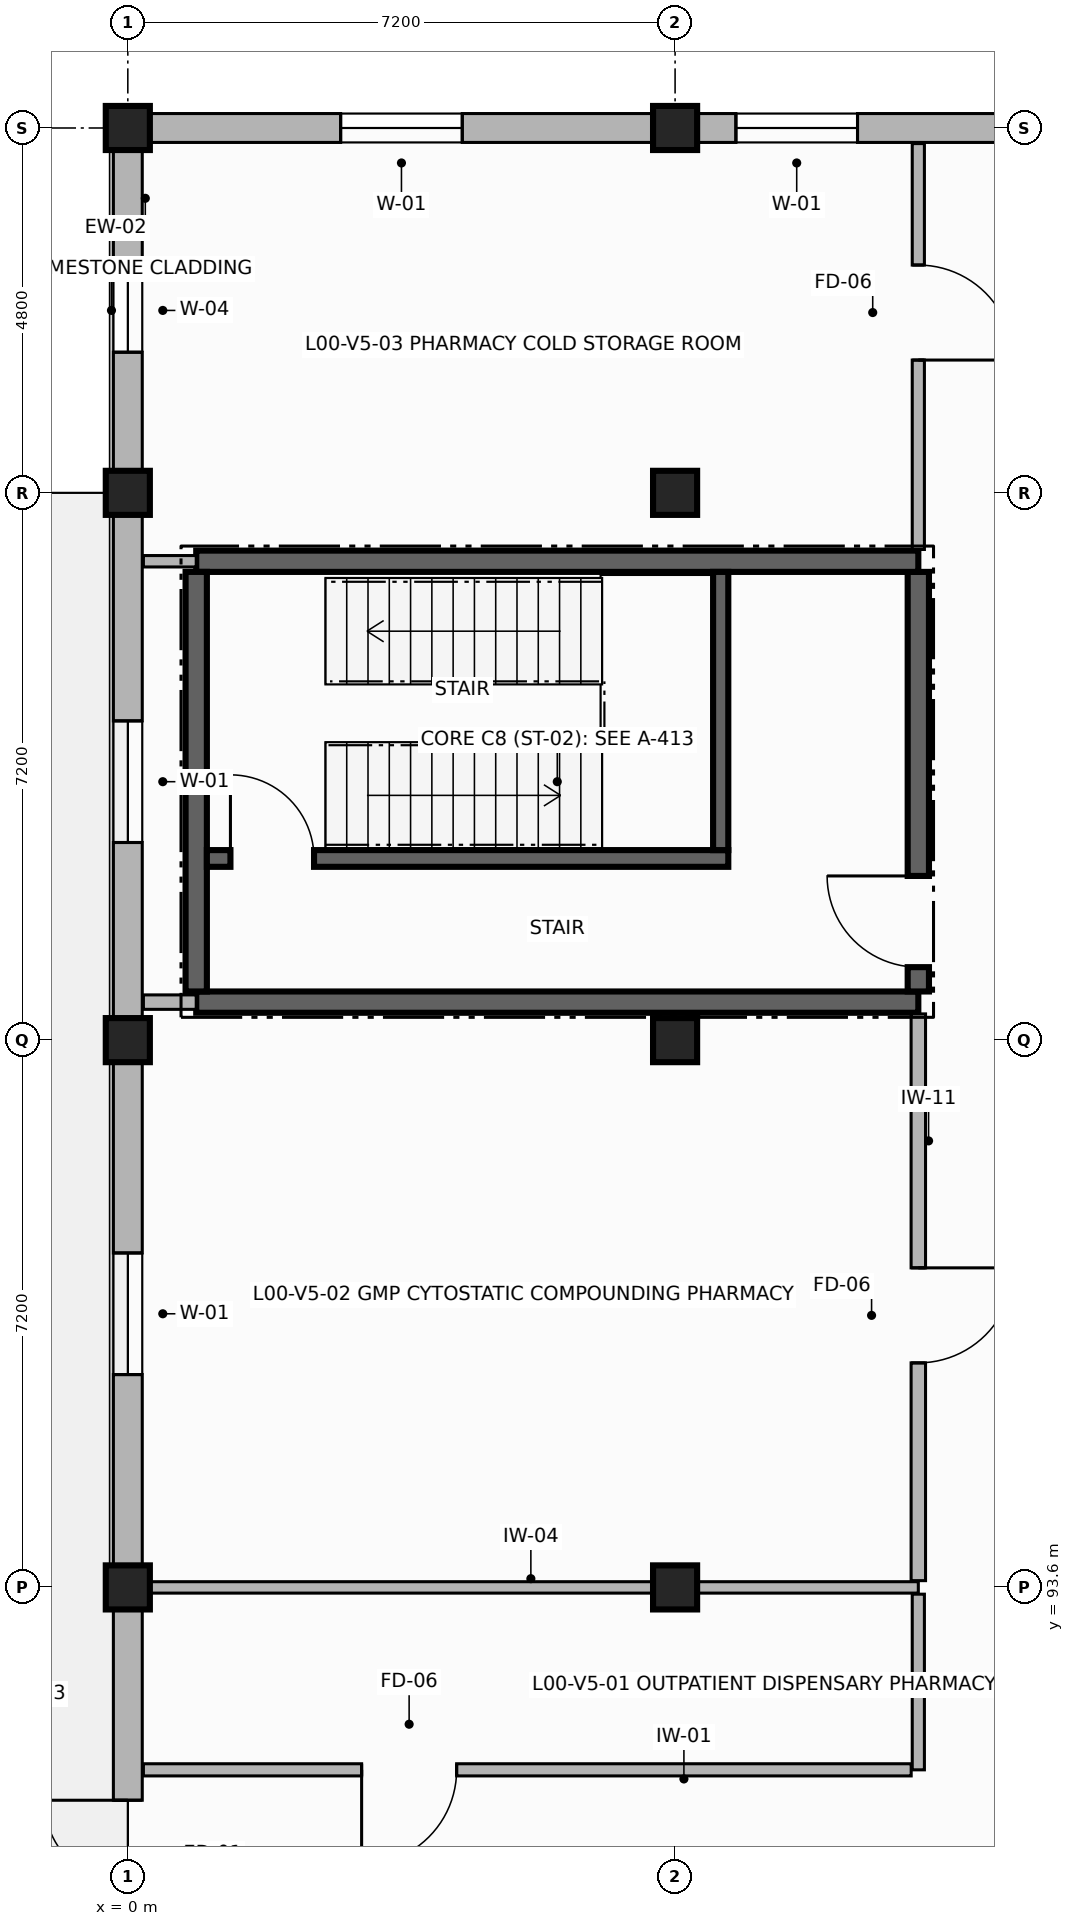
"""IFC4 building model, lengths in metres.
Left out: names, types, materials, properties, quantities, classifications, styles, units other than length and angle.
Written with IfcOpenShell. Run it as: python <this file> out.ifc"""

import sys

from ifc_helpers import new_model, si_unit, direction, frame, frame_2d, origin, origin_2d, place, context, subcontext, project, spatial, rectangle, extrude, element, fill, save


model = new_model("IFC4")
c1 = context("Model", 3, precision=1e-05, world=origin(), true_north=direction((0.0, 1.0)))
c2 = subcontext(c1, "Body", "Model", "MODEL_VIEW")
j1 = project(units=[si_unit("LENGTHUNIT", "METRE"), si_unit("PLANEANGLEUNIT", "RADIAN")], contexts=[c1])
p1 = place(None, origin())
s1 = spatial("IfcSite", under=j1, at=p1, CompositionType="ELEMENT")
p2 = place(p1, origin())
s2 = spatial("IfcBuilding", under=s1, at=p2, CompositionType="ELEMENT")
p3 = place(p2, origin())
s3 = spatial("IfcBuildingStorey", under=s2, at=p3, CompositionType="ELEMENT", Elevation=0.0)
for number, where, z_axis, x_axis in (
    (1, (0.0, 93.6, -0.38), (0.0, 0.0, 1.0), (1.0, 0.0, 0.0)),
    (2, (0.0, 100.8, -0.38), (0.0, 0.0, 1.0), (1.0, 0.0, 0.0)),
    (3, (0.0, 108.0, -0.38), (0.0, 0.0, 1.0), (1.0, 0.0, 0.0)),
    (4, (0.0, 112.8, -0.38), (0.0, 0.0, 1.0), (1.0, 0.0, 0.0)),
    (5, (7.2, 93.6, -0.38), (0.0, 0.0, 1.0), (1.0, 0.0, 0.0)),
    (6, (7.2, 100.8, -0.38), (0.0, 0.0, 1.0), (1.0, 0.0, 0.0)),
    (7, (7.2, 108.0, -0.38), (0.0, 0.0, 1.0), (1.0, 0.0, 0.0)),
    (8, (7.2, 112.8, -0.38), (0.0, 0.0, 1.0), (1.0, 0.0, 0.0)),
):
    element("IfcColumn", number, at=place(p3, frame(where, z_axis=z_axis, x_axis=x_axis)), inside=s3, PredefinedType="COLUMN", context=c2, shape_type="SweptSolid", body=[
        extrude(rectangle(XDim=0.58, YDim=0.58, at=origin_2d()), origin(), (0.0, 0.0, 1.0), 4.57),
    ])
p4 = place(p3, frame((14.4, 112.8, 0.0), z_axis=(0.0, 0.0, 1.0), x_axis=(-1.0, 0.0, 0.0)))
e9 = element("IfcWall", 9, at=p4, inside=s3, PredefinedType="SOLIDWALL", context=c2, shape_type="SweptSolid", body=[
    extrude(rectangle(XDim=7.2, YDim=0.38, at=frame_2d((3.6, 0.0))), origin(), (0.0, 0.0, 1.0), 3.52),
])
p5 = place(p4, frame((4.8, 0.0, 0.85)))
e10 = element("IfcOpeningElement", 10, at=p5, cuts=e9, PredefinedType="OPENING", context=c2, shape_type="SweptSolid", body=[
    extrude(rectangle(XDim=1.6, YDim=2.45, at=frame_2d((0.8, 1.225))), frame((0.0, 0.2, 0.0), z_axis=(0.0, -1.0, 0.0), x_axis=(1.0, 0.0, 0.0)), (0.0, 0.0, 1.0), 0.4),
])
p6 = place(p3, frame((7.2, 112.8, 0.0), z_axis=(0.0, 0.0, 1.0), x_axis=(-1.0, 0.0, 0.0)))
e11 = element("IfcWall", 11, at=p6, inside=s3, PredefinedType="SOLIDWALL", context=c2, shape_type="SweptSolid", body=[
    extrude(rectangle(XDim=7.2, YDim=0.38, at=frame_2d((3.6, 0.0))), origin(), (0.0, 0.0, 1.0), 3.52),
])
p7 = place(p6, frame((2.8, 0.0, 0.85)))
e12 = element("IfcOpeningElement", 12, at=p7, cuts=e11, PredefinedType="OPENING", context=c2, shape_type="SweptSolid", body=[
    extrude(rectangle(XDim=1.6, YDim=2.45, at=frame_2d((0.8, 1.225))), frame((0.0, 0.2, 0.0), z_axis=(0.0, -1.0, 0.0), x_axis=(1.0, 0.0, 0.0)), (0.0, 0.0, 1.0), 0.4),
])
p8 = place(p3, frame((0.0, 112.8, 0.0), z_axis=(0.0, 0.0, 1.0), x_axis=(0.0, -1.0, 0.0)))
e13 = element("IfcWall", 13, at=p8, inside=s3, PredefinedType="SOLIDWALL", context=c2, shape_type="SweptSolid", body=[
    extrude(rectangle(XDim=4.8, YDim=0.38, at=frame_2d((2.4, 0.0))), origin(), (0.0, 0.0, 1.0), 3.52),
])
p9 = place(p8, frame((1.85, 0.0, 0.85)))
e14 = element("IfcOpeningElement", 14, at=p9, cuts=e13, PredefinedType="OPENING", context=c2, shape_type="SweptSolid", body=[
    extrude(rectangle(XDim=1.1, YDim=2.35, at=frame_2d((0.55, 1.175))), frame((0.0, 0.2, 0.0), z_axis=(0.0, -1.0, 0.0), x_axis=(1.0, 0.0, 0.0)), (0.0, 0.0, 1.0), 0.4),
])
p10 = place(p3, frame((0.0, 108.0, 0.0), z_axis=(0.0, 0.0, 1.0), x_axis=(0.0, -1.0, 0.0)))
e15 = element("IfcWall", 15, at=p10, inside=s3, PredefinedType="SOLIDWALL", context=c2, shape_type="SweptSolid", body=[
    extrude(rectangle(XDim=7.2, YDim=0.38, at=frame_2d((3.6, 0.0))), origin(), (0.0, 0.0, 1.0), 3.52),
])
p11 = place(p10, frame((3.0, 0.0, 0.85)))
e16 = element("IfcOpeningElement", 16, at=p11, cuts=e15, PredefinedType="OPENING", context=c2, shape_type="SweptSolid", body=[
    extrude(rectangle(XDim=1.6, YDim=2.45, at=frame_2d((0.8, 1.225))), frame((0.0, 0.2, 0.0), z_axis=(0.0, -1.0, 0.0), x_axis=(1.0, 0.0, 0.0)), (0.0, 0.0, 1.0), 0.4),
])
p12 = place(p3, frame((0.0, 100.8, 0.0), z_axis=(0.0, 0.0, 1.0), x_axis=(0.0, -1.0, 0.0)))
e17 = element("IfcWall", 17, at=p12, inside=s3, PredefinedType="SOLIDWALL", context=c2, shape_type="SweptSolid", body=[
    extrude(rectangle(XDim=7.2, YDim=0.38, at=frame_2d((3.6, 0.0))), origin(), (0.0, 0.0, 1.0), 3.52),
])
p13 = place(p12, frame((2.8, 0.0, 0.85)))
e18 = element("IfcOpeningElement", 18, at=p13, cuts=e17, PredefinedType="OPENING", context=c2, shape_type="SweptSolid", body=[
    extrude(rectangle(XDim=1.6, YDim=2.45, at=frame_2d((0.8, 1.225))), frame((0.0, 0.2, 0.0), z_axis=(0.0, -1.0, 0.0), x_axis=(1.0, 0.0, 0.0)), (0.0, 0.0, 1.0), 0.4),
])
p14 = place(p3, frame((0.0, 93.6, 0.0), z_axis=(0.0, 0.0, 1.0), x_axis=(0.0, -1.0, 0.0)))
e19 = element("IfcWall", 19, at=p14, inside=s3, PredefinedType="SOLIDWALL", context=c2, shape_type="SweptSolid", body=[
    extrude(rectangle(XDim=7.2, YDim=0.38, at=frame_2d((3.6, 0.0))), origin(), (0.0, 0.0, 1.0), 3.52),
])
p15 = place(p14, frame((2.8, 0.0, 0.0)))
e20 = element("IfcOpeningElement", 20, at=p15, cuts=e19, PredefinedType="OPENING", context=c2, shape_type="SweptSolid", body=[
    extrude(rectangle(XDim=2.2, YDim=2.6, at=frame_2d((1.1, 1.3))), frame((0.0, 0.2, 0.0), z_axis=(0.0, -1.0, 0.0), x_axis=(1.0, 0.0, 0.0)), (0.0, 0.0, 1.0), 0.4),
])
p16 = place(p3, frame((0.9, 101.3, 0.0), z_axis=(0.0, 0.0, 1.0), x_axis=(1.0, 0.0, 0.0)))
e21 = element("IfcWall", 21, at=p16, inside=s3, PredefinedType="SHEAR", context=c2, shape_type="SweptSolid", body=[
    extrude(rectangle(XDim=9.5, YDim=0.28, at=frame_2d((4.75, 0.0))), origin(), (0.0, 0.0, 1.0), 4.19),
])
p17 = place(p3, frame((10.4, 101.44, 0.0), z_axis=(0.0, 0.0, 1.0), x_axis=(0.0, 1.0, 0.0)))
e22 = element("IfcWall", 22, at=p17, inside=s3, PredefinedType="SHEAR", context=c2, shape_type="SweptSolid", body=[
    extrude(rectangle(XDim=5.52, YDim=0.28, at=frame_2d((2.76, 0.0))), origin(), (0.0, 0.0, 1.0), 4.19),
])
p18 = place(p17, frame((0.32, 0.0, 0.0)))
e23 = element("IfcOpeningElement", 23, at=p18, cuts=e22, PredefinedType="OPENING", context=c2, shape_type="SweptSolid", body=[
    extrude(rectangle(XDim=1.2, YDim=2.25, at=frame_2d((0.6, 1.125))), frame((0.0, 0.15, 0.0), z_axis=(0.0, -1.0, 0.0), x_axis=(1.0, 0.0, 0.0)), (0.0, 0.0, 1.0), 0.3),
])
p19 = place(p3, frame((10.4, 107.1, 0.0), z_axis=(0.0, 0.0, 1.0), x_axis=(-1.0, 0.0, 0.0)))
e24 = element("IfcWall", 24, at=p19, inside=s3, PredefinedType="SHEAR", context=c2, shape_type="SweptSolid", body=[
    extrude(rectangle(XDim=9.5, YDim=0.28, at=frame_2d((4.75, 0.0))), origin(), (0.0, 0.0, 1.0), 4.19),
])
p20 = place(p3, frame((0.9, 106.96, 0.0), z_axis=(0.0, 0.0, 1.0), x_axis=(0.0, -1.0, 0.0)))
e25 = element("IfcWall", 25, at=p20, inside=s3, PredefinedType="SHEAR", context=c2, shape_type="SweptSolid", body=[
    extrude(rectangle(XDim=5.52, YDim=0.28, at=frame_2d((2.76, 0.0))), origin(), (0.0, 0.0, 1.0), 4.19),
])
p21 = place(p3, frame((1.04, 103.19, 0.0), z_axis=(0.0, 0.0, 1.0), x_axis=(1.0, 0.0, 0.0)))
e26 = element("IfcWall", 26, at=p21, inside=s3, PredefinedType="SHEAR", context=c2, shape_type="SweptSolid", body=[
    extrude(rectangle(XDim=6.86, YDim=0.22, at=frame_2d((3.43, 0.0))), origin(), (0.0, 0.0, 1.0), 4.19),
])
p22 = place(p21, frame((0.31, 0.0, 0.0)))
e27 = element("IfcOpeningElement", 27, at=p22, cuts=e26, PredefinedType="OPENING", context=c2, shape_type="SweptSolid", body=[
    extrude(rectangle(XDim=1.1, YDim=2.15, at=frame_2d((0.55, 1.075))), frame((0.0, 0.12, 0.0), z_axis=(0.0, -1.0, 0.0), x_axis=(1.0, 0.0, 0.0)), (0.0, 0.0, 1.0), 0.24),
])
p23 = place(p3, frame((7.8, 103.3, 0.0), z_axis=(0.0, 0.0, 1.0), x_axis=(0.0, 1.0, 0.0)))
e28 = element("IfcWall", 28, at=p23, inside=s3, PredefinedType="SHEAR", context=c2, shape_type="SweptSolid", body=[
    extrude(rectangle(XDim=3.66, YDim=0.2, at=frame_2d((1.83, 0.0))), origin(), (0.0, 0.0, 1.0), 4.19),
])
p24 = place(p3, frame((0.205, 93.6, 0.0), z_axis=(0.0, 0.0, 1.0), x_axis=(1.0, 0.0, 0.0)))
e29 = element("IfcWall", 29, at=p24, inside=s3, PredefinedType="PARTITIONING", context=c2, shape_type="SweptSolid", body=[
    extrude(rectangle(XDim=10.195, YDim=0.15, at=frame_2d((5.097, 0.0))), origin(), (0.0, 0.0, 1.0), 3.5),
])
p25 = place(p3, frame((10.4, 93.511, 0.0), z_axis=(0.0, 0.0, 1.0), x_axis=(0.0, -1.0, 0.0)))
e30 = element("IfcWall", 30, at=p25, inside=s3, PredefinedType="PARTITIONING", context=c2, shape_type="SweptSolid", body=[
    extrude(rectangle(XDim=2.311, YDim=0.16, at=frame_2d((1.156, 0.0))), origin(), (0.0, 0.0, 1.0), 3.5),
])
p26 = place(p3, frame((10.306, 91.2, 0.0), z_axis=(0.0, 0.0, 1.0), x_axis=(-1.0, 0.0, 0.0)))
e31 = element("IfcWall", 31, at=p26, inside=s3, PredefinedType="PARTITIONING", context=c2, shape_type="SweptSolid", body=[
    extrude(rectangle(XDim=10.101, YDim=0.16, at=frame_2d((5.05, 0.0))), origin(), (0.0, 0.0, 1.0), 3.5),
])
p27 = place(p26, frame((5.98, 0.0, 0.0)))
e32 = element("IfcOpeningElement", 32, at=p27, cuts=e31, PredefinedType="OPENING", context=c2, shape_type="SweptSolid", body=[
    extrude(rectangle(XDim=1.25, YDim=2.2, at=frame_2d((0.625, 1.1))), frame((0.0, 0.09, 0.0), z_axis=(0.0, -1.0, 0.0), x_axis=(1.0, 0.0, 0.0)), (0.0, 0.0, 1.0), 0.18),
])
p28 = place(p3, frame((0.205, 101.3, 0.0), z_axis=(0.0, 0.0, 1.0), x_axis=(1.0, 0.0, 0.0)))
e33 = element("IfcWall", 33, at=p28, inside=s3, PredefinedType="PARTITIONING", context=c2, shape_type="SweptSolid", body=[
    extrude(rectangle(XDim=0.695, YDim=0.19, at=frame_2d((0.347, 0.0))), origin(), (0.0, 0.0, 1.0), 3.5),
])
p29 = place(p3, frame((10.4, 101.145, 0.0), z_axis=(0.0, 0.0, 1.0), x_axis=(0.0, -1.0, 0.0)))
e34 = element("IfcWall", 34, at=p29, inside=s3, PredefinedType="PARTITIONING", context=c2, shape_type="SweptSolid", body=[
    extrude(rectangle(XDim=7.456, YDim=0.19, at=frame_2d((3.728, 0.0))), origin(), (0.0, 0.0, 1.0), 3.5),
])
p30 = place(p29, frame((3.341, 0.0, 0.0)))
e35 = element("IfcOpeningElement", 35, at=p30, cuts=e34, PredefinedType="OPENING", context=c2, shape_type="SweptSolid", body=[
    extrude(rectangle(XDim=1.25, YDim=2.2, at=frame_2d((0.625, 1.1))), frame((0.0, 0.105, 0.0), z_axis=(0.0, -1.0, 0.0), x_axis=(1.0, 0.0, 0.0)), (0.0, 0.0, 1.0), 0.21),
])
p31 = place(p3, frame((10.4, 112.595, 0.0), z_axis=(0.0, 0.0, 1.0), x_axis=(0.0, -1.0, 0.0)))
e36 = element("IfcWall", 36, at=p31, inside=s3, PredefinedType="PARTITIONING", context=c2, shape_type="SweptSolid", body=[
    extrude(rectangle(XDim=5.34, YDim=0.16, at=frame_2d((2.67, 0.0))), origin(), (0.0, 0.0, 1.0), 3.5),
])
p32 = place(p31, frame((1.598, 0.0, 0.0)))
e37 = element("IfcOpeningElement", 37, at=p32, cuts=e36, PredefinedType="OPENING", context=c2, shape_type="SweptSolid", body=[
    extrude(rectangle(XDim=1.25, YDim=2.2, at=frame_2d((0.625, 1.1))), frame((0.0, 0.09, 0.0), z_axis=(0.0, -1.0, 0.0), x_axis=(1.0, 0.0, 0.0)), (0.0, 0.0, 1.0), 0.18),
])
p33 = place(p3, frame((0.9, 107.1, 0.0), z_axis=(0.0, 0.0, 1.0), x_axis=(-1.0, 0.0, 0.0)))
e38 = element("IfcWall", 38, at=p33, inside=s3, PredefinedType="PARTITIONING", context=c2, shape_type="SweptSolid", body=[
    extrude(rectangle(XDim=0.695, YDim=0.15, at=frame_2d((0.347, 0.0))), origin(), (0.0, 0.0, 1.0), 3.5),
])
p34 = place(p5, origin())
e39 = element("IfcWindow", 39, at=p34, inside=s3, PartitioningType="SINGLE_PANEL", PredefinedType="WINDOW", context=c2, shape_type="SweptSolid", body=[
    extrude(rectangle(XDim=1.6, YDim=2.45, at=frame_2d((0.8, 1.225))), frame((0.0, 0.03, 0.0), z_axis=(0.0, -1.0, 0.0), x_axis=(1.0, 0.0, 0.0)), (0.0, 0.0, 1.0), 0.06),
])
fill(e10, e39)
p35 = place(p7, origin())
e40 = element("IfcWindow", 40, at=p35, inside=s3, PartitioningType="SINGLE_PANEL", PredefinedType="WINDOW", context=c2, shape_type="SweptSolid", body=[
    extrude(rectangle(XDim=1.6, YDim=2.45, at=frame_2d((0.8, 1.225))), frame((0.0, 0.03, 0.0), z_axis=(0.0, -1.0, 0.0), x_axis=(1.0, 0.0, 0.0)), (0.0, 0.0, 1.0), 0.06),
])
fill(e12, e40)
p36 = place(p9, origin())
e41 = element("IfcWindow", 41, at=p36, inside=s3, PartitioningType="SINGLE_PANEL", PredefinedType="WINDOW", context=c2, shape_type="SweptSolid", body=[
    extrude(rectangle(XDim=1.1, YDim=2.35, at=frame_2d((0.55, 1.175))), frame((0.0, 0.03, 0.0), z_axis=(0.0, -1.0, 0.0), x_axis=(1.0, 0.0, 0.0)), (0.0, 0.0, 1.0), 0.06),
])
fill(e14, e41)
p37 = place(p11, origin())
e42 = element("IfcWindow", 42, at=p37, inside=s3, PartitioningType="SINGLE_PANEL", PredefinedType="WINDOW", context=c2, shape_type="SweptSolid", body=[
    extrude(rectangle(XDim=1.6, YDim=2.45, at=frame_2d((0.8, 1.225))), frame((0.0, 0.03, 0.0), z_axis=(0.0, -1.0, 0.0), x_axis=(1.0, 0.0, 0.0)), (0.0, 0.0, 1.0), 0.06),
])
fill(e16, e42)
p38 = place(p13, origin())
e43 = element("IfcWindow", 43, at=p38, inside=s3, PartitioningType="SINGLE_PANEL", PredefinedType="WINDOW", context=c2, shape_type="SweptSolid", body=[
    extrude(rectangle(XDim=1.6, YDim=2.45, at=frame_2d((0.8, 1.225))), frame((0.0, 0.03, 0.0), z_axis=(0.0, -1.0, 0.0), x_axis=(1.0, 0.0, 0.0)), (0.0, 0.0, 1.0), 0.06),
])
fill(e18, e43)
p39 = place(p15, frame((2.2, 0.0, 0.0), z_axis=(0.0, 0.0, 1.0), x_axis=(-1.0, 0.0, 0.0)))
e44 = element("IfcDoor", 44, at=p39, inside=s3, OperationType="DOUBLE_DOOR_SINGLE_SWING", PredefinedType="DOOR", context=c2, shape_type="SweptSolid", body=[
    extrude(rectangle(XDim=2.2, YDim=2.6, at=frame_2d((1.1, 1.3))), frame((0.0, 0.025, 0.0), z_axis=(0.0, -1.0, 0.0), x_axis=(1.0, 0.0, 0.0)), (0.0, 0.0, 1.0), 0.05),
])
fill(e20, e44)
p40 = place(p22, origin())
e45 = element("IfcDoor", 45, at=p40, inside=s3, OperationType="SINGLE_SWING_LEFT", PredefinedType="DOOR", context=c2, shape_type="SweptSolid", body=[
    extrude(rectangle(XDim=1.1, YDim=2.15, at=frame_2d((0.55, 1.075))), frame((0.0, 0.025, 0.0), z_axis=(0.0, -1.0, 0.0), x_axis=(1.0, 0.0, 0.0)), (0.0, 0.0, 1.0), 0.05),
])
fill(e27, e45)
p41 = place(p18, origin())
e46 = element("IfcDoor", 46, at=p41, inside=s3, OperationType="SINGLE_SWING_RIGHT", PredefinedType="DOOR", context=c2, shape_type="SweptSolid", body=[
    extrude(rectangle(XDim=1.2, YDim=2.25, at=frame_2d((0.6, 1.125))), frame((0.0, 0.025, 0.0), z_axis=(0.0, -1.0, 0.0), x_axis=(1.0, 0.0, 0.0)), (0.0, 0.0, 1.0), 0.05),
])
fill(e23, e46)
p42 = place(p27, origin())
e47 = element("IfcDoor", 47, at=p42, inside=s3, OperationType="SINGLE_SWING_RIGHT", PredefinedType="DOOR", context=c2, shape_type="SweptSolid", body=[
    extrude(rectangle(XDim=1.25, YDim=2.2, at=frame_2d((0.625, 1.1))), frame((0.0, 0.025, 0.0), z_axis=(0.0, -1.0, 0.0), x_axis=(1.0, 0.0, 0.0)), (0.0, 0.0, 1.0), 0.05),
])
fill(e32, e47)
p43 = place(p30, origin())
e48 = element("IfcDoor", 48, at=p43, inside=s3, OperationType="SINGLE_SWING_LEFT", PredefinedType="DOOR", context=c2, shape_type="SweptSolid", body=[
    extrude(rectangle(XDim=1.25, YDim=2.2, at=frame_2d((0.625, 1.1))), frame((0.0, 0.025, 0.0), z_axis=(0.0, -1.0, 0.0), x_axis=(1.0, 0.0, 0.0)), (0.0, 0.0, 1.0), 0.05),
])
fill(e35, e48)
p44 = place(p32, origin())
e49 = element("IfcDoor", 49, at=p44, inside=s3, OperationType="SINGLE_SWING_RIGHT", PredefinedType="DOOR", context=c2, shape_type="SweptSolid", body=[
    extrude(rectangle(XDim=1.25, YDim=2.2, at=frame_2d((0.625, 1.1))), frame((0.0, 0.025, 0.0), z_axis=(0.0, -1.0, 0.0), x_axis=(1.0, 0.0, 0.0)), (0.0, 0.0, 1.0), 0.05),
])
fill(e37, e49)
save(model, sys.argv[1])
